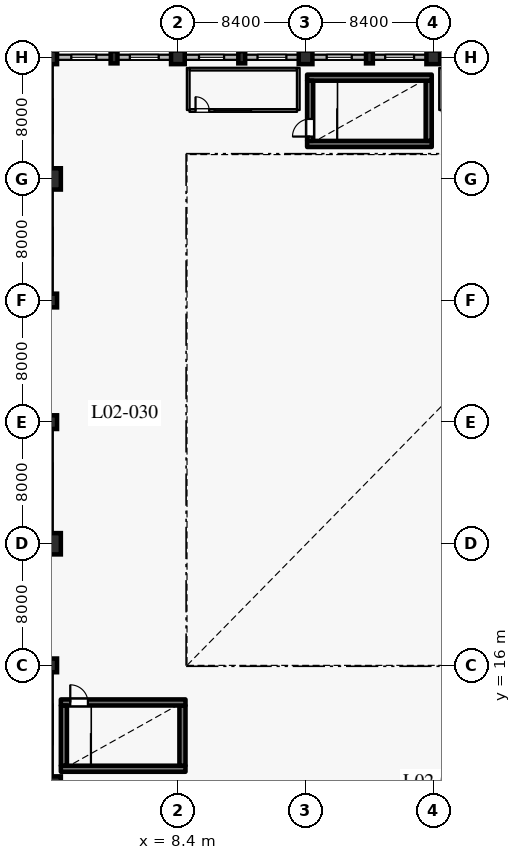
"""IFC4 building model, lengths in metres.
Left out: names, types, materials, properties, quantities, classifications, styles, units other than length and angle.
Written with IfcOpenShell. Run it as: python <this file> out.ifc"""

import sys

from ifc_helpers import new_model, si_unit, direction, frame, frame_2d, origin, origin_2d, place, context, subcontext, project, spatial, rectangle, circle, extrude, element, fill, save


model = new_model("IFC4")
c1 = context("Model", 3, precision=1e-05, world=origin(), true_north=direction((0.0, 1.0)))
c2 = subcontext(c1, "Body", "Model", "MODEL_VIEW")
j1 = project(units=[si_unit("LENGTHUNIT", "METRE"), si_unit("PLANEANGLEUNIT", "RADIAN")], contexts=[c1])
p1 = place(None, origin())
s1 = spatial("IfcSite", under=j1, at=p1, CompositionType="ELEMENT")
p2 = place(p1, origin())
s2 = spatial("IfcBuilding", under=s1, at=p2, CompositionType="ELEMENT")
p3 = place(p2, frame((0.0, 0.0, 11.4)))
s3 = spatial("IfcBuildingStorey", under=s2, at=p3, CompositionType="ELEMENT", Elevation=11.4)
p4 = place(p3, frame((0.0, 8.0, 0.0), z_axis=(0.0, 0.0, 1.0), x_axis=(1.0, 0.0, 0.0)))
e1 = element("IfcColumn", 1, at=p4, inside=s3, PredefinedType="COLUMN", context=c2, shape_type="SweptSolid", body=[
    extrude(circle(Radius=0.7, at=origin_2d()), origin(), (0.0, 0.0, 1.0), 4.8),
])
p5 = place(p3, frame((0.0, 16.0, 0.0), z_axis=(0.0, 0.0, 1.0), x_axis=(1.0, 0.0, 0.0)))
e2 = element("IfcColumn", 2, at=p5, inside=s3, PredefinedType="COLUMN", context=c2, shape_type="SweptSolid", body=[
    extrude(rectangle(XDim=0.9, YDim=0.9, at=origin_2d()), origin(), (0.0, 0.0, 1.0), 4.8),
])
p6 = place(p3, frame((0.0, 24.0, 0.0), z_axis=(0.0, 0.0, 1.0), x_axis=(1.0, 0.0, 0.0)))
e3 = element("IfcColumn", 3, at=p6, inside=s3, PredefinedType="COLUMN", context=c2, shape_type="SweptSolid", body=[
    extrude(circle(Radius=0.7, at=origin_2d()), origin(), (0.0, 0.0, 1.0), 4.8),
])
for number, where, z_axis, x_axis in (
    (4, (0.0, 32.0, 0.0), (0.0, 0.0, 1.0), (1.0, 0.0, 0.0)),
    (5, (0.0, 40.0, 0.0), (0.0, 0.0, 1.0), (1.0, 0.0, 0.0)),
):
    element("IfcColumn", number, at=place(p3, frame(where, z_axis=z_axis, x_axis=x_axis)), inside=s3, PredefinedType="COLUMN", context=c2, shape_type="SweptSolid", body=[
        extrude(rectangle(XDim=0.9, YDim=0.9, at=origin_2d()), origin(), (0.0, 0.0, 1.0), 4.8),
    ])
p7 = place(p3, frame((0.0, 48.0, 0.0), z_axis=(0.0, 0.0, 1.0), x_axis=(1.0, 0.0, 0.0)))
e6 = element("IfcColumn", 6, at=p7, inside=s3, PredefinedType="COLUMN", context=c2, shape_type="SweptSolid", body=[
    extrude(circle(Radius=0.7, at=origin_2d()), origin(), (0.0, 0.0, 1.0), 4.8),
])
p8 = place(p3, frame((0.0, 56.0, 0.0), z_axis=(0.0, 0.0, 1.0), x_axis=(1.0, 0.0, 0.0)))
e7 = element("IfcColumn", 7, at=p8, inside=s3, PredefinedType="COLUMN", context=c2, shape_type="SweptSolid", body=[
    extrude(rectangle(XDim=0.9, YDim=0.9, at=origin_2d()), origin(), (0.0, 0.0, 1.0), 4.8),
])
p9 = place(p3, frame((4.2, 56.0, 0.0), z_axis=(0.0, 0.0, 1.0), x_axis=(1.0, 0.0, 0.0)))
e8 = element("IfcColumn", 8, at=p9, inside=s3, PredefinedType="PILASTER", context=c2, shape_type="SweptSolid", body=[
    extrude(rectangle(XDim=0.45, YDim=0.8, at=origin_2d()), origin(), (0.0, 0.0, 1.0), 4.8),
])
p10 = place(p3, frame((8.4, 56.0, 0.0), z_axis=(0.0, 0.0, 1.0), x_axis=(1.0, 0.0, 0.0)))
e9 = element("IfcColumn", 9, at=p10, inside=s3, PredefinedType="COLUMN", context=c2, shape_type="SweptSolid", body=[
    extrude(rectangle(XDim=0.9, YDim=0.9, at=origin_2d()), origin(), (0.0, 0.0, 1.0), 4.8),
])
p11 = place(p3, frame((12.6, 56.0, 0.0), z_axis=(0.0, 0.0, 1.0), x_axis=(1.0, 0.0, 0.0)))
e10 = element("IfcColumn", 10, at=p11, inside=s3, PredefinedType="PILASTER", context=c2, shape_type="SweptSolid", body=[
    extrude(rectangle(XDim=0.45, YDim=0.8, at=origin_2d()), origin(), (0.0, 0.0, 1.0), 4.8),
])
p12 = place(p3, frame((16.8, 56.0, 0.0), z_axis=(0.0, 0.0, 1.0), x_axis=(1.0, 0.0, 0.0)))
e11 = element("IfcColumn", 11, at=p12, inside=s3, PredefinedType="COLUMN", context=c2, shape_type="SweptSolid", body=[
    extrude(rectangle(XDim=0.9, YDim=0.9, at=origin_2d()), origin(), (0.0, 0.0, 1.0), 4.8),
])
p13 = place(p3, frame((21.0, 56.0, 0.0), z_axis=(0.0, 0.0, 1.0), x_axis=(1.0, 0.0, 0.0)))
e12 = element("IfcColumn", 12, at=p13, inside=s3, PredefinedType="PILASTER", context=c2, shape_type="SweptSolid", body=[
    extrude(rectangle(XDim=0.45, YDim=0.8, at=origin_2d()), origin(), (0.0, 0.0, 1.0), 4.8),
])
p14 = place(p3, frame((25.2, 56.0, 0.0), z_axis=(0.0, 0.0, 1.0), x_axis=(1.0, 0.0, 0.0)))
e13 = element("IfcColumn", 13, at=p14, inside=s3, PredefinedType="COLUMN", context=c2, shape_type="SweptSolid", body=[
    extrude(rectangle(XDim=0.9, YDim=0.9, at=origin_2d()), origin(), (0.0, 0.0, 1.0), 4.8),
])
p15 = place(p3, frame((0.0, 8.7, 0.0), z_axis=(0.0, 0.0, 1.0), x_axis=(0.0, 1.0, 0.0)))
e14 = element("IfcWall", 14, at=p15, inside=s3, PredefinedType="SOLIDWALL", context=c2, shape_type="SweptSolid", body=[
    extrude(rectangle(XDim=6.85, YDim=0.34, at=frame_2d((3.425, 0.0))), origin(), (0.0, 0.0, 1.0), 3.6),
])
p16 = place(p15, frame((2.075, 0.0, 1.4)))
e15 = element("IfcOpeningElement", 15, at=p16, cuts=e14, PredefinedType="OPENING", context=c2, shape_type="SweptSolid", body=[
    extrude(rectangle(XDim=2.7, YDim=1.2, at=frame_2d((1.35, 0.6))), frame((0.0, 0.18, 0.0), z_axis=(0.0, -1.0, 0.0), x_axis=(1.0, 0.0, 0.0)), (0.0, 0.0, 1.0), 0.36),
])
p17 = place(p3, frame((0.0, 24.7, 0.0), z_axis=(0.0, 0.0, 1.0), x_axis=(0.0, 1.0, 0.0)))
e16 = element("IfcWall", 16, at=p17, inside=s3, PredefinedType="SOLIDWALL", context=c2, shape_type="SweptSolid", body=[
    extrude(rectangle(XDim=6.85, YDim=0.34, at=frame_2d((3.425, 0.0))), origin(), (0.0, 0.0, 1.0), 3.6),
])
p18 = place(p17, frame((2.225, 0.0, 1.4)))
e17 = element("IfcOpeningElement", 17, at=p18, cuts=e16, PredefinedType="OPENING", context=c2, shape_type="SweptSolid", body=[
    extrude(rectangle(XDim=2.4, YDim=1.2, at=frame_2d((1.2, 0.6))), frame((0.0, 0.18, 0.0), z_axis=(0.0, -1.0, 0.0), x_axis=(1.0, 0.0, 0.0)), (0.0, 0.0, 1.0), 0.36),
])
p19 = place(p3, frame((0.0, 40.45, 0.0), z_axis=(0.0, 0.0, 1.0), x_axis=(0.0, 1.0, 0.0)))
e18 = element("IfcWall", 18, at=p19, inside=s3, PredefinedType="SOLIDWALL", context=c2, shape_type="SweptSolid", body=[
    extrude(rectangle(XDim=6.85, YDim=0.34, at=frame_2d((3.425, 0.0))), origin(), (0.0, 0.0, 1.0), 3.6),
])
p20 = place(p19, frame((2.475, 0.0, 1.4)))
e19 = element("IfcOpeningElement", 19, at=p20, cuts=e18, PredefinedType="OPENING", context=c2, shape_type="SweptSolid", body=[
    extrude(rectangle(XDim=1.9, YDim=1.4, at=frame_2d((0.95, 0.7))), frame((0.0, 0.18, 0.0), z_axis=(0.0, -1.0, 0.0), x_axis=(1.0, 0.0, 0.0)), (0.0, 0.0, 1.0), 0.36),
])
p21 = place(p3, frame((0.0, 48.7, 0.0), z_axis=(0.0, 0.0, 1.0), x_axis=(0.0, 1.0, 0.0)))
e20 = element("IfcWall", 20, at=p21, inside=s3, PredefinedType="SOLIDWALL", context=c2, shape_type="SweptSolid", body=[
    extrude(rectangle(XDim=6.85, YDim=0.34, at=frame_2d((3.425, 0.0))), origin(), (0.0, 0.0, 1.0), 3.6),
])
p22 = place(p21, frame((2.275, 0.0, 1.4)))
e21 = element("IfcOpeningElement", 21, at=p22, cuts=e20, PredefinedType="OPENING", context=c2, shape_type="SweptSolid", body=[
    extrude(rectangle(XDim=2.3, YDim=1.5, at=frame_2d((1.15, 0.75))), frame((0.0, 0.18, 0.0), z_axis=(0.0, -1.0, 0.0), x_axis=(1.0, 0.0, 0.0)), (0.0, 0.0, 1.0), 0.36),
])
p23 = place(p3, frame((0.45, 56.0, 0.0), z_axis=(0.0, 0.0, 1.0), x_axis=(1.0, 0.0, 0.0)))
e22 = element("IfcWall", 22, at=p23, inside=s3, PredefinedType="SOLIDWALL", context=c2, shape_type="SweptSolid", body=[
    extrude(rectangle(XDim=3.525, YDim=0.34, at=frame_2d((1.763, 0.0))), origin(), (0.0, 0.0, 1.0), 3.6),
])
p24 = place(p23, frame((0.938, 0.0, 1.25)))
e23 = element("IfcOpeningElement", 23, at=p24, cuts=e22, PredefinedType="OPENING", context=c2, shape_type="SweptSolid", body=[
    extrude(rectangle(XDim=1.65, YDim=1.35, at=frame_2d((0.825, 0.675))), frame((0.0, 0.18, 0.0), z_axis=(0.0, -1.0, 0.0), x_axis=(1.0, 0.0, 0.0)), (0.0, 0.0, 1.0), 0.36),
])
p25 = place(p3, frame((4.425, 56.0, 0.0), z_axis=(0.0, 0.0, 1.0), x_axis=(1.0, 0.0, 0.0)))
e24 = element("IfcWall", 24, at=p25, inside=s3, PredefinedType="SOLIDWALL", context=c2, shape_type="SweptSolid", body=[
    extrude(rectangle(XDim=3.525, YDim=0.34, at=frame_2d((1.762, 0.0))), origin(), (0.0, 0.0, 1.0), 3.6),
])
p26 = place(p25, frame((0.813, 0.0, 1.25)))
e25 = element("IfcOpeningElement", 25, at=p26, cuts=e24, PredefinedType="OPENING", context=c2, shape_type="SweptSolid", body=[
    extrude(rectangle(XDim=1.9, YDim=1.4, at=frame_2d((0.95, 0.7))), frame((0.0, 0.18, 0.0), z_axis=(0.0, -1.0, 0.0), x_axis=(1.0, 0.0, 0.0)), (0.0, 0.0, 1.0), 0.36),
])
p27 = place(p3, frame((8.85, 56.0, 0.0), z_axis=(0.0, 0.0, 1.0), x_axis=(1.0, 0.0, 0.0)))
e26 = element("IfcWall", 26, at=p27, inside=s3, PredefinedType="SOLIDWALL", context=c2, shape_type="SweptSolid", body=[
    extrude(rectangle(XDim=3.525, YDim=0.34, at=frame_2d((1.762, 0.0))), origin(), (0.0, 0.0, 1.0), 3.6),
])
p28 = place(p27, frame((0.938, 0.0, 1.25)))
e27 = element("IfcOpeningElement", 27, at=p28, cuts=e26, PredefinedType="OPENING", context=c2, shape_type="SweptSolid", body=[
    extrude(rectangle(XDim=1.65, YDim=1.35, at=frame_2d((0.825, 0.675))), frame((0.0, 0.18, 0.0), z_axis=(0.0, -1.0, 0.0), x_axis=(1.0, 0.0, 0.0)), (0.0, 0.0, 1.0), 0.36),
])
p29 = place(p3, frame((12.825, 56.0, 0.0), z_axis=(0.0, 0.0, 1.0), x_axis=(1.0, 0.0, 0.0)))
e28 = element("IfcWall", 28, at=p29, inside=s3, PredefinedType="SOLIDWALL", context=c2, shape_type="SweptSolid", body=[
    extrude(rectangle(XDim=3.525, YDim=0.34, at=frame_2d((1.763, 0.0))), origin(), (0.0, 0.0, 1.0), 3.6),
])
p30 = place(p29, frame((0.813, 0.0, 1.25)))
e29 = element("IfcOpeningElement", 29, at=p30, cuts=e28, PredefinedType="OPENING", context=c2, shape_type="SweptSolid", body=[
    extrude(rectangle(XDim=1.9, YDim=1.4, at=frame_2d((0.95, 0.7))), frame((0.0, 0.18, 0.0), z_axis=(0.0, -1.0, 0.0), x_axis=(1.0, 0.0, 0.0)), (0.0, 0.0, 1.0), 0.36),
])
p31 = place(p3, frame((17.25, 56.0, 0.0), z_axis=(0.0, 0.0, 1.0), x_axis=(1.0, 0.0, 0.0)))
e30 = element("IfcWall", 30, at=p31, inside=s3, PredefinedType="SOLIDWALL", context=c2, shape_type="SweptSolid", body=[
    extrude(rectangle(XDim=3.525, YDim=0.34, at=frame_2d((1.762, 0.0))), origin(), (0.0, 0.0, 1.0), 3.6),
])
p32 = place(p31, frame((0.937, 0.0, 1.25)))
e31 = element("IfcOpeningElement", 31, at=p32, cuts=e30, PredefinedType="OPENING", context=c2, shape_type="SweptSolid", body=[
    extrude(rectangle(XDim=1.65, YDim=1.35, at=frame_2d((0.825, 0.675))), frame((0.0, 0.18, 0.0), z_axis=(0.0, -1.0, 0.0), x_axis=(1.0, 0.0, 0.0)), (0.0, 0.0, 1.0), 0.36),
])
p33 = place(p3, frame((21.225, 56.0, 0.0), z_axis=(0.0, 0.0, 1.0), x_axis=(1.0, 0.0, 0.0)))
e32 = element("IfcWall", 32, at=p33, inside=s3, PredefinedType="SOLIDWALL", context=c2, shape_type="SweptSolid", body=[
    extrude(rectangle(XDim=3.525, YDim=0.34, at=frame_2d((1.762, 0.0))), origin(), (0.0, 0.0, 1.0), 3.6),
])
p34 = place(p33, frame((0.812, 0.0, 1.25)))
e33 = element("IfcOpeningElement", 33, at=p34, cuts=e32, PredefinedType="OPENING", context=c2, shape_type="SweptSolid", body=[
    extrude(rectangle(XDim=1.9, YDim=1.4, at=frame_2d((0.95, 0.7))), frame((0.0, 0.18, 0.0), z_axis=(0.0, -1.0, 0.0), x_axis=(1.0, 0.0, 0.0)), (0.0, 0.0, 1.0), 0.36),
])
p35 = place(p3, frame((25.65, 56.0, 0.0), z_axis=(0.0, 0.0, 1.0), x_axis=(1.0, 0.0, 0.0)))
e34 = element("IfcWall", 34, at=p35, inside=s3, PredefinedType="SOLIDWALL", context=c2, shape_type="SweptSolid", body=[
    extrude(rectangle(XDim=3.525, YDim=0.34, at=frame_2d((1.763, 0.0))), origin(), (0.0, 0.0, 1.0), 3.6),
])
p36 = place(p35, frame((0.938, 0.0, 1.25)))
e35 = element("IfcOpeningElement", 35, at=p36, cuts=e34, PredefinedType="OPENING", context=c2, shape_type="SweptSolid", body=[
    extrude(rectangle(XDim=1.65, YDim=1.35, at=frame_2d((0.825, 0.675))), frame((0.0, 0.18, 0.0), z_axis=(0.0, -1.0, 0.0), x_axis=(1.0, 0.0, 0.0)), (0.0, 0.0, 1.0), 0.36),
])
p37 = place(p3, frame((0.7, 9.2, 0.0), z_axis=(0.0, 0.0, 1.0), x_axis=(1.0, 0.0, 0.0)))
e36 = element("IfcWall", 36, at=p37, inside=s3, PredefinedType="SHEAR", context=c2, shape_type="SweptSolid", body=[
    extrude(rectangle(XDim=8.2, YDim=0.4, at=frame_2d((4.1, 0.0))), origin(), (0.0, 0.0, 1.0), 4.535),
])
p38 = place(p3, frame((8.7, 9.405, 0.0), z_axis=(0.0, 0.0, 1.0), x_axis=(0.0, 1.0, 0.0)))
e37 = element("IfcWall", 37, at=p38, inside=s3, PredefinedType="SHEAR", context=c2, shape_type="SweptSolid", body=[
    extrude(rectangle(XDim=3.95, YDim=0.4, at=frame_2d((1.975, 0.0))), origin(), (0.0, 0.0, 1.0), 4.535),
])
p39 = place(p3, frame((0.7, 13.56, 0.0), z_axis=(0.0, 0.0, 1.0), x_axis=(1.0, 0.0, 0.0)))
e38 = element("IfcWall", 38, at=p39, inside=s3, PredefinedType="SHEAR", context=c2, shape_type="SweptSolid", body=[
    extrude(rectangle(XDim=8.2, YDim=0.4, at=frame_2d((4.1, 0.0))), origin(), (0.0, 0.0, 1.0), 4.535),
])
p40 = place(p39, frame((0.62, 0.0, 0.0)))
e39 = element("IfcOpeningElement", 39, at=p40, cuts=e38, PredefinedType="OPENING", context=c2, shape_type="SweptSolid", body=[
    extrude(rectangle(XDim=1.16, YDim=2.2, at=frame_2d((0.58, 1.1))), frame((0.0, 0.21, 0.0), z_axis=(0.0, -1.0, 0.0), x_axis=(1.0, 0.0, 0.0)), (0.0, 0.0, 1.0), 0.42),
])
p41 = place(p3, frame((0.9, 9.405, 0.0), z_axis=(0.0, 0.0, 1.0), x_axis=(0.0, 1.0, 0.0)))
e40 = element("IfcWall", 40, at=p41, inside=s3, PredefinedType="SHEAR", context=c2, shape_type="SweptSolid", body=[
    extrude(rectangle(XDim=3.95, YDim=0.4, at=frame_2d((1.975, 0.0))), origin(), (0.0, 0.0, 1.0), 4.535),
])
p42 = place(p3, frame((16.9, 50.3, 0.0), z_axis=(0.0, 0.0, 1.0), x_axis=(1.0, 0.0, 0.0)))
e41 = element("IfcWall", 41, at=p42, inside=s3, PredefinedType="SHEAR", context=c2, shape_type="SweptSolid", body=[
    extrude(rectangle(XDim=8.2, YDim=0.4, at=frame_2d((4.1, 0.0))), origin(), (0.0, 0.0, 1.0), 4.535),
])
p43 = place(p3, frame((24.9, 50.505, 0.0), z_axis=(0.0, 0.0, 1.0), x_axis=(0.0, 1.0, 0.0)))
e42 = element("IfcWall", 42, at=p43, inside=s3, PredefinedType="SHEAR", context=c2, shape_type="SweptSolid", body=[
    extrude(rectangle(XDim=3.95, YDim=0.4, at=frame_2d((1.975, 0.0))), origin(), (0.0, 0.0, 1.0), 4.535),
])
p44 = place(p3, frame((16.9, 54.66, 0.0), z_axis=(0.0, 0.0, 1.0), x_axis=(1.0, 0.0, 0.0)))
e43 = element("IfcWall", 43, at=p44, inside=s3, PredefinedType="SHEAR", context=c2, shape_type="SweptSolid", body=[
    extrude(rectangle(XDim=8.2, YDim=0.4, at=frame_2d((4.1, 0.0))), origin(), (0.0, 0.0, 1.0), 4.535),
])
p45 = place(p3, frame((17.1, 50.505, 0.0), z_axis=(0.0, 0.0, 1.0), x_axis=(0.0, 1.0, 0.0)))
e44 = element("IfcWall", 44, at=p45, inside=s3, PredefinedType="SHEAR", context=c2, shape_type="SweptSolid", body=[
    extrude(rectangle(XDim=3.95, YDim=0.4, at=frame_2d((1.975, 0.0))), origin(), (0.0, 0.0, 1.0), 4.535),
])
p46 = place(p45, frame((0.28, 0.0, 0.0)))
e45 = element("IfcOpeningElement", 45, at=p46, cuts=e44, PredefinedType="OPENING", context=c2, shape_type="SweptSolid", body=[
    extrude(rectangle(XDim=1.16, YDim=2.2, at=frame_2d((0.58, 1.1))), frame((0.0, 0.21, 0.0), z_axis=(0.0, -1.0, 0.0), x_axis=(1.0, 0.0, 0.0)), (0.0, 0.0, 1.0), 0.42),
])
p47 = place(p3, frame((9.16, 52.5, 0.0), z_axis=(0.0, 0.0, 1.0), x_axis=(1.0, 0.0, 0.0)))
e46 = element("IfcWall", 46, at=p47, inside=s3, PredefinedType="PARTITIONING", context=c2, shape_type="SweptSolid", body=[
    extrude(rectangle(XDim=7.08, YDim=0.18, at=frame_2d((3.54, 0.0))), origin(), (0.0, 0.0, 1.0), 4.535),
])
p48 = place(p47, frame((0.4, 0.0, 0.0)))
e47 = element("IfcOpeningElement", 47, at=p48, cuts=e46, PredefinedType="OPENING", context=c2, shape_type="SweptSolid", body=[
    extrude(rectangle(XDim=0.9, YDim=2.1, at=frame_2d((0.45, 1.05))), frame((0.0, 0.1, 0.0), z_axis=(0.0, -1.0, 0.0), x_axis=(1.0, 0.0, 0.0)), (0.0, 0.0, 1.0), 0.2),
])
p49 = place(p47, frame((1.65, 0.0, 0.9)))
e48 = element("IfcOpeningElement", 48, at=p49, cuts=e46, PredefinedType="OPENING", context=c2, shape_type="SweptSolid", body=[
    extrude(rectangle(XDim=2.4, YDim=1.3, at=frame_2d((1.2, 0.65))), frame((0.0, 0.1, 0.0), z_axis=(0.0, -1.0, 0.0), x_axis=(1.0, 0.0, 0.0)), (0.0, 0.0, 1.0), 0.2),
])
for number, where, z_axis, x_axis in (
    (49, (9.08, 52.532, 0.0), (0.0, 0.0, 1.0), (0.0, 1.0, 0.0)),
    (50, (16.32, 52.532, 0.0), (0.0, 0.0, 1.0), (0.0, 1.0, 0.0)),
):
    element("IfcWall", number, at=place(p3, frame(where, z_axis=z_axis, x_axis=x_axis)), inside=s3, PredefinedType="PARTITIONING", context=c2, shape_type="SweptSolid", body=[
        extrude(rectangle(XDim=2.768, YDim=0.18, at=frame_2d((1.384, 0.0))), origin(), (0.0, 0.0, 1.0), 4.535),
    ])
p50 = place(p3, frame((9.17, 55.22, 0.0), z_axis=(0.0, 0.0, 1.0), x_axis=(1.0, 0.0, 0.0)))
e51 = element("IfcWall", 51, at=p50, inside=s3, PredefinedType="PARTITIONING", context=c2, shape_type="SweptSolid", body=[
    extrude(rectangle(XDim=7.06, YDim=0.18, at=frame_2d((3.53, 0.0))), origin(), (0.0, 0.0, 1.0), 4.535),
])
p51 = place(p3, frame((25.68, 52.532, 0.0), z_axis=(0.0, 0.0, 1.0), x_axis=(0.0, 1.0, 0.0)))
e52 = element("IfcWall", 52, at=p51, inside=s3, PredefinedType="PARTITIONING", context=c2, shape_type="SweptSolid", body=[
    extrude(rectangle(XDim=2.768, YDim=0.18, at=frame_2d((1.384, 0.0))), origin(), (0.0, 0.0, 1.0), 4.535),
])
p52 = place(p24, origin())
e53 = element("IfcWindow", 53, at=p52, inside=s3, PartitioningType="SINGLE_PANEL", PredefinedType="WINDOW", context=c2, shape_type="SweptSolid", body=[
    extrude(rectangle(XDim=1.65, YDim=1.35, at=frame_2d((0.825, 0.675))), frame((0.0, 0.03, 0.0), z_axis=(0.0, -1.0, 0.0), x_axis=(1.0, 0.0, 0.0)), (0.0, 0.0, 1.0), 0.06),
])
fill(e23, e53)
p53 = place(p26, origin())
e54 = element("IfcWindow", 54, at=p53, inside=s3, PartitioningType="DOUBLE_PANEL_VERTICAL", PredefinedType="WINDOW", context=c2, shape_type="SweptSolid", body=[
    extrude(rectangle(XDim=1.9, YDim=1.4, at=frame_2d((0.95, 0.7))), frame((0.0, 0.03, 0.0), z_axis=(0.0, -1.0, 0.0), x_axis=(1.0, 0.0, 0.0)), (0.0, 0.0, 1.0), 0.06),
])
fill(e25, e54)
p54 = place(p28, origin())
e55 = element("IfcWindow", 55, at=p54, inside=s3, PartitioningType="SINGLE_PANEL", PredefinedType="WINDOW", context=c2, shape_type="SweptSolid", body=[
    extrude(rectangle(XDim=1.65, YDim=1.35, at=frame_2d((0.825, 0.675))), frame((0.0, 0.03, 0.0), z_axis=(0.0, -1.0, 0.0), x_axis=(1.0, 0.0, 0.0)), (0.0, 0.0, 1.0), 0.06),
])
fill(e27, e55)
p55 = place(p30, origin())
e56 = element("IfcWindow", 56, at=p55, inside=s3, PartitioningType="DOUBLE_PANEL_VERTICAL", PredefinedType="WINDOW", context=c2, shape_type="SweptSolid", body=[
    extrude(rectangle(XDim=1.9, YDim=1.4, at=frame_2d((0.95, 0.7))), frame((0.0, 0.03, 0.0), z_axis=(0.0, -1.0, 0.0), x_axis=(1.0, 0.0, 0.0)), (0.0, 0.0, 1.0), 0.06),
])
fill(e29, e56)
p56 = place(p32, origin())
e57 = element("IfcWindow", 57, at=p56, inside=s3, PartitioningType="SINGLE_PANEL", PredefinedType="WINDOW", context=c2, shape_type="SweptSolid", body=[
    extrude(rectangle(XDim=1.65, YDim=1.35, at=frame_2d((0.825, 0.675))), frame((0.0, 0.03, 0.0), z_axis=(0.0, -1.0, 0.0), x_axis=(1.0, 0.0, 0.0)), (0.0, 0.0, 1.0), 0.06),
])
fill(e31, e57)
p57 = place(p34, origin())
e58 = element("IfcWindow", 58, at=p57, inside=s3, PartitioningType="DOUBLE_PANEL_VERTICAL", PredefinedType="WINDOW", context=c2, shape_type="SweptSolid", body=[
    extrude(rectangle(XDim=1.9, YDim=1.4, at=frame_2d((0.95, 0.7))), frame((0.0, 0.03, 0.0), z_axis=(0.0, -1.0, 0.0), x_axis=(1.0, 0.0, 0.0)), (0.0, 0.0, 1.0), 0.06),
])
fill(e33, e58)
p58 = place(p40, origin())
e59 = element("IfcDoor", 59, at=p58, inside=s3, OperationType="SINGLE_SWING_LEFT", PredefinedType="DOOR", context=c2, shape_type="SweptSolid", body=[
    extrude(rectangle(XDim=1.16, YDim=2.2, at=frame_2d((0.58, 1.1))), frame((0.0, 0.025, 0.0), z_axis=(0.0, -1.0, 0.0), x_axis=(1.0, 0.0, 0.0)), (0.0, 0.0, 1.0), 0.05),
])
fill(e39, e59)
p59 = place(p46, origin())
e60 = element("IfcDoor", 60, at=p59, inside=s3, OperationType="SINGLE_SWING_LEFT", PredefinedType="DOOR", context=c2, shape_type="SweptSolid", body=[
    extrude(rectangle(XDim=1.16, YDim=2.2, at=frame_2d((0.58, 1.1))), frame((0.0, 0.025, 0.0), z_axis=(0.0, -1.0, 0.0), x_axis=(1.0, 0.0, 0.0)), (0.0, 0.0, 1.0), 0.05),
])
fill(e45, e60)
p60 = place(p48, origin())
e61 = element("IfcDoor", 61, at=p60, inside=s3, OperationType="SINGLE_SWING_LEFT", PredefinedType="DOOR", context=c2, shape_type="SweptSolid", body=[
    extrude(rectangle(XDim=0.9, YDim=2.1, at=frame_2d((0.45, 1.05))), frame((0.0, 0.025, 0.0), z_axis=(0.0, -1.0, 0.0), x_axis=(1.0, 0.0, 0.0)), (0.0, 0.0, 1.0), 0.05),
])
fill(e47, e61)
p61 = place(p49, origin())
e62 = element("IfcWindow", 62, at=p61, inside=s3, PartitioningType="DOUBLE_PANEL_VERTICAL", PredefinedType="WINDOW", context=c2, shape_type="SweptSolid", body=[
    extrude(rectangle(XDim=2.4, YDim=1.3, at=frame_2d((1.2, 0.65))), frame((0.0, 0.03, 0.0), z_axis=(0.0, -1.0, 0.0), x_axis=(1.0, 0.0, 0.0)), (0.0, 0.0, 1.0), 0.06),
])
fill(e48, e62)
save(model, sys.argv[1])
